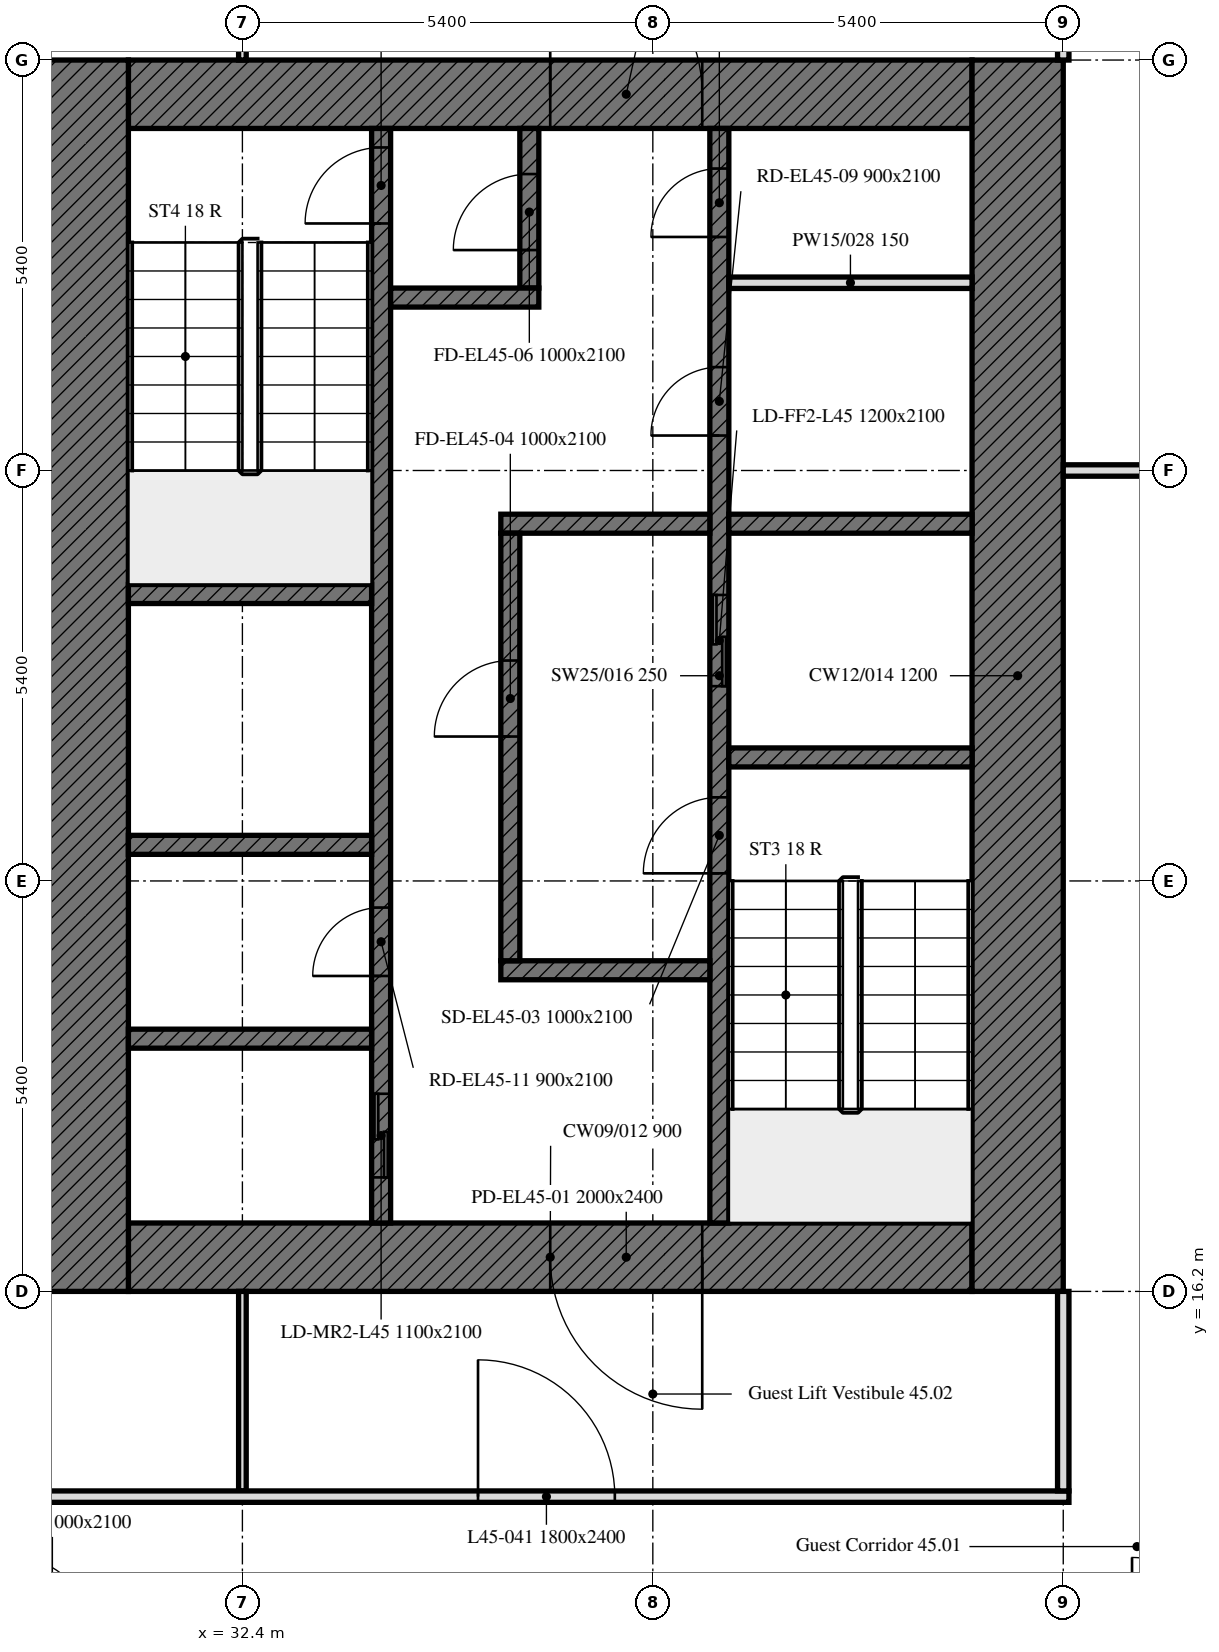
"""IFC4 building model, lengths in metres.
Left out: names, types, materials, properties, quantities, classifications, styles, units other than length and angle.
Written with IfcOpenShell. Run it as: python <this file> out.ifc"""

import sys

from ifc_helpers import new_model, si_unit, direction, frame, frame_2d, origin, place, context, subcontext, project, spatial, rectangle, extrude, element, fill, save


model = new_model("IFC4")
c1 = context("Model", 3, precision=1e-05, world=origin(), true_north=direction((0.0, 1.0)))
c2 = subcontext(c1, "Body", "Model", "MODEL_VIEW")
j1 = project(units=[si_unit("LENGTHUNIT", "METRE"), si_unit("PLANEANGLEUNIT", "RADIAN")], contexts=[c1])
p1 = place(None, origin())
s1 = spatial("IfcSite", under=j1, at=p1, CompositionType="ELEMENT")
p2 = place(p1, origin())
s2 = spatial("IfcBuilding", under=s1, at=p2, CompositionType="ELEMENT")
p3 = place(p2, frame((0.0, 0.0, 187.3)))
s3 = spatial("IfcBuildingStorey", under=s2, at=p3, CompositionType="ELEMENT", Elevation=187.3)
p4 = place(p3, frame((42.0, 16.65, 0.0), z_axis=(0.0, 0.0, 1.0), x_axis=(-1.0, 0.0, 0.0)))
e1 = element("IfcWall", 1, at=p4, inside=s3, PredefinedType="SOLIDWALL", context=c2, shape_type="SweptSolid", body=[
    extrude(rectangle(XDim=11.1, YDim=0.9, at=frame_2d((5.55, 0.0))), origin(), (0.0, 0.0, 1.0), 3.0),
])
p5 = place(p4, frame((3.55, 0.0, 0.0)))
e2 = element("IfcOpeningElement", 2, at=p5, cuts=e1, PredefinedType="OPENING", context=c2, shape_type="SweptSolid", body=[
    extrude(rectangle(XDim=2.0, YDim=2.4, at=frame_2d((1.0, 1.2))), frame((0.0, 0.45, 0.0), z_axis=(0.0, -1.0, 0.0), x_axis=(1.0, 0.0, 0.0)), (0.0, 0.0, 1.0), 0.9),
])
p6 = place(p3, frame((30.9, 31.95, 0.0), z_axis=(0.0, 0.0, 1.0), x_axis=(1.0, 0.0, 0.0)))
e3 = element("IfcWall", 3, at=p6, inside=s3, PredefinedType="SOLIDWALL", context=c2, shape_type="SweptSolid", body=[
    extrude(rectangle(XDim=11.1, YDim=0.9, at=frame_2d((5.55, 0.0))), origin(), (0.0, 0.0, 1.0), 3.0),
])
p7 = place(p6, frame((5.55, 0.0, 0.0)))
e4 = element("IfcOpeningElement", 4, at=p7, cuts=e3, PredefinedType="OPENING", context=c2, shape_type="SweptSolid", body=[
    extrude(rectangle(XDim=2.0, YDim=2.4, at=frame_2d((1.0, 1.2))), frame((0.0, 0.45, 0.0), z_axis=(0.0, -1.0, 0.0), x_axis=(1.0, 0.0, 0.0)), (0.0, 0.0, 1.0), 0.9),
])
for number, where, z_axis, x_axis in (
    (5, (42.6, 32.4, 0.0), (0.0, 0.0, 1.0), (0.0, -1.0, 0.0)),
    (6, (30.3, 16.2, 0.0), (0.0, 0.0, 1.0), (0.0, 1.0, 0.0)),
):
    element("IfcWall", number, at=place(p3, frame(where, z_axis=z_axis, x_axis=x_axis)), inside=s3, PredefinedType="SOLIDWALL", context=c2, shape_type="SweptSolid", body=[
        extrude(rectangle(XDim=16.2, YDim=1.2, at=frame_2d((8.1, 0.0))), origin(), (0.0, 0.0, 1.0), 3.0),
    ])
p8 = place(p3, frame((38.675, 17.1, 0.0), z_axis=(0.0, 0.0, 1.0), x_axis=(0.0, 1.0, 0.0)))
e7 = element("IfcWall", 7, at=p8, inside=s3, PredefinedType="SOLIDWALL", context=c2, shape_type="SweptSolid", body=[
    extrude(rectangle(XDim=14.4, YDim=0.25, at=frame_2d((7.2, 0.0))), origin(), (0.0, 0.0, 1.0), 3.0),
])
p9 = place(p8, frame((4.6, 0.0, 0.0)))
e8 = element("IfcOpeningElement", 8, at=p9, cuts=e7, PredefinedType="OPENING", context=c2, shape_type="SweptSolid", body=[
    extrude(rectangle(XDim=1.0, YDim=2.1, at=frame_2d((0.5, 1.05))), frame((0.0, 0.125, 0.0), z_axis=(0.0, -1.0, 0.0), x_axis=(1.0, 0.0, 0.0)), (0.0, 0.0, 1.0), 0.25),
])
p10 = place(p8, frame((7.062, 0.0, 0.0)))
e9 = element("IfcOpeningElement", 9, at=p10, cuts=e7, PredefinedType="OPENING", context=c2, shape_type="SweptSolid", body=[
    extrude(rectangle(XDim=1.2, YDim=2.1, at=frame_2d((0.6, 1.05))), frame((0.0, 0.125, 0.0), z_axis=(0.0, -1.0, 0.0), x_axis=(1.0, 0.0, 0.0)), (0.0, 0.0, 1.0), 0.25),
])
p11 = place(p8, frame((10.36, 0.0, 0.0)))
e10 = element("IfcOpeningElement", 10, at=p11, cuts=e7, PredefinedType="OPENING", context=c2, shape_type="SweptSolid", body=[
    extrude(rectangle(XDim=0.9, YDim=2.1, at=frame_2d((0.45, 1.05))), frame((0.0, 0.125, 0.0), z_axis=(0.0, -1.0, 0.0), x_axis=(1.0, 0.0, 0.0)), (0.0, 0.0, 1.0), 0.25),
])
p12 = place(p8, frame((12.972, 0.0, 0.0)))
e11 = element("IfcOpeningElement", 11, at=p12, cuts=e7, PredefinedType="OPENING", context=c2, shape_type="SweptSolid", body=[
    extrude(rectangle(XDim=0.9, YDim=2.1, at=frame_2d((0.45, 1.05))), frame((0.0, 0.125, 0.0), z_axis=(0.0, -1.0, 0.0), x_axis=(1.0, 0.0, 0.0)), (0.0, 0.0, 1.0), 0.25),
])
p13 = place(p3, frame((34.225, 17.1, 0.0), z_axis=(0.0, 0.0, 1.0), x_axis=(0.0, 1.0, 0.0)))
e12 = element("IfcWall", 12, at=p13, inside=s3, PredefinedType="SOLIDWALL", context=c2, shape_type="SweptSolid", body=[
    extrude(rectangle(XDim=14.4, YDim=0.25, at=frame_2d((7.2, 0.0))), origin(), (0.0, 0.0, 1.0), 3.0),
])
p14 = place(p13, frame((13.15, 0.0, 0.0)))
e13 = element("IfcOpeningElement", 13, at=p14, cuts=e12, PredefinedType="OPENING", context=c2, shape_type="SweptSolid", body=[
    extrude(rectangle(XDim=1.0, YDim=2.1, at=frame_2d((0.5, 1.05))), frame((0.0, 0.125, 0.0), z_axis=(0.0, -1.0, 0.0), x_axis=(1.0, 0.0, 0.0)), (0.0, 0.0, 1.0), 0.25),
])
p15 = place(p13, frame((0.6, 0.0, 0.0)))
e14 = element("IfcOpeningElement", 14, at=p15, cuts=e12, PredefinedType="OPENING", context=c2, shape_type="SweptSolid", body=[
    extrude(rectangle(XDim=1.1, YDim=2.1, at=frame_2d((0.55, 1.05))), frame((0.0, 0.125, 0.0), z_axis=(0.0, -1.0, 0.0), x_axis=(1.0, 0.0, 0.0)), (0.0, 0.0, 1.0), 0.25),
])
p16 = place(p13, frame((3.25, 0.0, 0.0)))
e15 = element("IfcOpeningElement", 15, at=p16, cuts=e12, PredefinedType="OPENING", context=c2, shape_type="SweptSolid", body=[
    extrude(rectangle(XDim=0.9, YDim=2.1, at=frame_2d((0.45, 1.05))), frame((0.0, 0.125, 0.0), z_axis=(0.0, -1.0, 0.0), x_axis=(1.0, 0.0, 0.0)), (0.0, 0.0, 1.0), 0.25),
])
p17 = place(p3, frame((38.8, 23.225, 0.0), z_axis=(0.0, 0.0, 1.0), x_axis=(1.0, 0.0, 0.0)))
e16 = element("IfcWall", 16, at=p17, inside=s3, PredefinedType="SOLIDWALL", context=c2, shape_type="SweptSolid", body=[
    extrude(rectangle(XDim=3.2, YDim=0.25, at=frame_2d((1.6, 0.0))), origin(), (0.0, 0.0, 1.0), 3.0),
])
for number, where, z_axis, x_axis in (
    (17, (30.9, 25.375, 0.0), (0.0, 0.0, 1.0), (1.0, 0.0, 0.0)),
    (18, (30.9, 22.075, 0.0), (0.0, 0.0, 1.0), (1.0, 0.0, 0.0)),
):
    element("IfcWall", number, at=place(p3, frame(where, z_axis=z_axis, x_axis=x_axis)), inside=s3, PredefinedType="SOLIDWALL", context=c2, shape_type="SweptSolid", body=[
        extrude(rectangle(XDim=3.2, YDim=0.25, at=frame_2d((1.6, 0.0))), origin(), (0.0, 0.0, 1.0), 3.0),
    ])
p18 = place(p3, frame((38.8, 26.3, 0.0), z_axis=(0.0, 0.0, 1.0), x_axis=(1.0, 0.0, 0.0)))
e19 = element("IfcWall", 19, at=p18, inside=s3, PredefinedType="SOLIDWALL", context=c2, shape_type="SweptSolid", body=[
    extrude(rectangle(XDim=3.2, YDim=0.25, at=frame_2d((1.6, 0.0))), origin(), (0.0, 0.0, 1.0), 3.0),
])
for number, where, z_axis, x_axis in (
    (20, (35.8, 26.3, 0.0), (0.0, 0.0, 1.0), (1.0, 0.0, 0.0)),
    (21, (35.8, 20.425, 0.0), (0.0, 0.0, 1.0), (1.0, 0.0, 0.0)),
):
    element("IfcWall", number, at=place(p3, frame(where, z_axis=z_axis, x_axis=x_axis)), inside=s3, PredefinedType="SOLIDWALL", context=c2, shape_type="SweptSolid", body=[
        extrude(rectangle(XDim=2.75, YDim=0.25, at=frame_2d((1.375, 0.0))), origin(), (0.0, 0.0, 1.0), 3.0),
    ])
p19 = place(p3, frame((36.175, 29.4, 0.0), z_axis=(0.0, 0.0, 1.0), x_axis=(0.0, 1.0, 0.0)))
e22 = element("IfcWall", 22, at=p19, inside=s3, PredefinedType="SOLIDWALL", context=c2, shape_type="SweptSolid", body=[
    extrude(rectangle(XDim=2.1, YDim=0.25, at=frame_2d((1.05, 0.0))), origin(), (0.0, 0.0, 1.0), 3.0),
])
p20 = place(p19, frame((0.5, 0.0, 0.0)))
e23 = element("IfcOpeningElement", 23, at=p20, cuts=e22, PredefinedType="OPENING", context=c2, shape_type="SweptSolid", body=[
    extrude(rectangle(XDim=1.0, YDim=2.1, at=frame_2d((0.5, 1.05))), frame((0.0, 0.125, 0.0), z_axis=(0.0, -1.0, 0.0), x_axis=(1.0, 0.0, 0.0)), (0.0, 0.0, 1.0), 0.25),
])
p21 = place(p3, frame((34.35, 29.275, 0.0), z_axis=(0.0, 0.0, 1.0), x_axis=(1.0, 0.0, 0.0)))
e24 = element("IfcWall", 24, at=p21, inside=s3, PredefinedType="SOLIDWALL", context=c2, shape_type="SweptSolid", body=[
    extrude(rectangle(XDim=1.95, YDim=0.25, at=frame_2d((0.975, 0.0))), origin(), (0.0, 0.0, 1.0), 3.0),
])
p22 = place(p3, frame((35.925, 20.55, 0.0), z_axis=(0.0, 0.0, 1.0), x_axis=(0.0, 1.0, 0.0)))
e25 = element("IfcWall", 25, at=p22, inside=s3, PredefinedType="SOLIDWALL", context=c2, shape_type="SweptSolid", body=[
    extrude(rectangle(XDim=5.625, YDim=0.25, at=frame_2d((2.812, 0.0))), origin(), (0.0, 0.0, 1.0), 3.0),
])
p23 = place(p22, frame((2.95, 0.0, 0.0)))
e26 = element("IfcOpeningElement", 26, at=p23, cuts=e25, PredefinedType="OPENING", context=c2, shape_type="SweptSolid", body=[
    extrude(rectangle(XDim=1.0, YDim=2.1, at=frame_2d((0.5, 1.05))), frame((0.0, 0.125, 0.0), z_axis=(0.0, -1.0, 0.0), x_axis=(1.0, 0.0, 0.0)), (0.0, 0.0, 1.0), 0.25),
])
p24 = place(p3, frame((30.9, 19.525, 0.0), z_axis=(0.0, 0.0, 1.0), x_axis=(1.0, 0.0, 0.0)))
e27 = element("IfcWall", 27, at=p24, inside=s3, PredefinedType="SOLIDWALL", context=c2, shape_type="SweptSolid", body=[
    extrude(rectangle(XDim=3.2, YDim=0.25, at=frame_2d((1.6, 0.0))), origin(), (0.0, 0.0, 1.0), 3.0),
])
p25 = place(p3, frame((38.8, 29.47, 0.0), z_axis=(0.0, 0.0, 1.0), x_axis=(1.0, 0.0, 0.0)))
e28 = element("IfcWall", 28, at=p25, inside=s3, PredefinedType="PARTITIONING", context=c2, shape_type="SweptSolid", body=[
    extrude(rectangle(XDim=3.2, YDim=0.15, at=frame_2d((1.6, 0.0))), origin(), (0.0, 0.0, 1.0), 3.0),
])
p26 = place(p3, frame((32.4, 32.4, 0.0), z_axis=(0.0, 0.0, 1.0), x_axis=(0.0, 1.0, 0.0)))
e29 = element("IfcWall", 29, at=p26, inside=s3, PredefinedType="PARTITIONING", context=c2, shape_type="SweptSolid", body=[
    extrude(rectangle(XDim=4.98, YDim=0.1, at=frame_2d((2.49, 0.0))), origin(), (0.0, 0.0, 1.0), 2.4),
])
p27 = place(p3, frame((43.2, 32.4, 0.0), z_axis=(0.0, 0.0, 1.0), x_axis=(0.0, 1.0, 0.0)))
e30 = element("IfcWall", 30, at=p27, inside=s3, PredefinedType="PARTITIONING", context=c2, shape_type="SweptSolid", body=[
    extrude(rectangle(XDim=4.98, YDim=0.15, at=frame_2d((2.49, 0.0))), origin(), (0.0, 0.0, 1.0), 3.0),
])
p28 = place(p3, frame((43.2, 27.0, 0.0), z_axis=(0.0, 0.0, 1.0), x_axis=(1.0, 0.0, 0.0)))
e31 = element("IfcWall", 31, at=p28, inside=s3, PredefinedType="PARTITIONING", context=c2, shape_type="SweptSolid", body=[
    extrude(rectangle(XDim=2.025, YDim=0.15, at=frame_2d((1.013, 0.0))), origin(), (0.0, 0.0, 1.0), 2.4),
])
p29 = place(p3, frame((32.4, 13.575, 0.0), z_axis=(0.0, 0.0, 1.0), x_axis=(0.0, 1.0, 0.0)))
e32 = element("IfcWall", 32, at=p29, inside=s3, PredefinedType="PARTITIONING", context=c2, shape_type="SweptSolid", body=[
    extrude(rectangle(XDim=2.625, YDim=0.1, at=frame_2d((1.312, 0.0))), origin(), (0.0, 0.0, 1.0), 3.0),
])
p30 = place(p3, frame((6.151, 13.5, 0.0), z_axis=(0.0, 0.0, 1.0), x_axis=(1.0, 0.0, 0.0)))
e33 = element("IfcWall", 33, at=p30, inside=s3, PredefinedType="PARTITIONING", context=c2, shape_type="SweptSolid", body=[
    extrude(rectangle(XDim=37.124, YDim=0.15, at=frame_2d((18.562, 0.0))), origin(), (0.0, 0.0, 1.0), 3.0),
])
p31 = place(p30, frame((17.649, 0.0, 0.0)))
e34 = element("IfcOpeningElement", 34, at=p31, cuts=e33, PredefinedType="OPENING", context=c2, shape_type="SweptSolid", body=[
    extrude(rectangle(XDim=1.0, YDim=2.1, at=frame_2d((0.5, 1.05))), frame((0.0, 0.075, 0.0), z_axis=(0.0, -1.0, 0.0), x_axis=(1.0, 0.0, 0.0)), (0.0, 0.0, 1.0), 0.15),
])
p32 = place(p30, frame((2.349, 0.0, 0.0)))
e35 = element("IfcOpeningElement", 35, at=p32, cuts=e33, PredefinedType="OPENING", context=c2, shape_type="SweptSolid", body=[
    extrude(rectangle(XDim=1.8, YDim=2.4, at=frame_2d((0.9, 1.2))), frame((0.0, 0.075, 0.0), z_axis=(0.0, -1.0, 0.0), x_axis=(1.0, 0.0, 0.0)), (0.0, 0.0, 1.0), 0.15),
])
p33 = place(p30, frame((29.349, 0.0, 0.0)))
e36 = element("IfcOpeningElement", 36, at=p33, cuts=e33, PredefinedType="OPENING", context=c2, shape_type="SweptSolid", body=[
    extrude(rectangle(XDim=1.8, YDim=2.4, at=frame_2d((0.9, 1.2))), frame((0.0, 0.075, 0.0), z_axis=(0.0, -1.0, 0.0), x_axis=(1.0, 0.0, 0.0)), (0.0, 0.0, 1.0), 0.15),
])
p34 = place(p3, frame((43.2, 13.575, 0.0), z_axis=(0.0, 0.0, 1.0), x_axis=(0.0, 1.0, 0.0)))
e37 = element("IfcWall", 37, at=p34, inside=s3, PredefinedType="PARTITIONING", context=c2, shape_type="SweptSolid", body=[
    extrude(rectangle(XDim=2.625, YDim=0.15, at=frame_2d((1.312, 0.0))), origin(), (0.0, 0.0, 1.0), 3.0),
])
p35 = place(p5, origin())
e38 = element("IfcDoor", 38, at=p35, inside=s3, OperationType="DOUBLE_DOOR_SINGLE_SWING", PredefinedType="DOOR", context=c2, shape_type="SweptSolid", body=[
    extrude(rectangle(XDim=2.0, YDim=2.4, at=frame_2d((1.0, 1.2))), frame((0.0, 0.025, 0.0), z_axis=(0.0, -1.0, 0.0), x_axis=(1.0, 0.0, 0.0)), (0.0, 0.0, 1.0), 0.05),
])
fill(e2, e38)
p36 = place(p7, origin())
e39 = element("IfcDoor", 39, at=p36, inside=s3, OperationType="DOUBLE_DOOR_SINGLE_SWING", PredefinedType="DOOR", context=c2, shape_type="SweptSolid", body=[
    extrude(rectangle(XDim=2.0, YDim=2.4, at=frame_2d((1.0, 1.2))), frame((0.0, 0.025, 0.0), z_axis=(0.0, -1.0, 0.0), x_axis=(1.0, 0.0, 0.0)), (0.0, 0.0, 1.0), 0.05),
])
fill(e4, e39)
p37 = place(p9, origin())
e40 = element("IfcDoor", 40, at=p37, inside=s3, OperationType="SINGLE_SWING_LEFT", PredefinedType="DOOR", context=c2, shape_type="SweptSolid", body=[
    extrude(rectangle(XDim=1.0, YDim=2.1, at=frame_2d((0.5, 1.05))), frame((0.0, 0.025, 0.0), z_axis=(0.0, -1.0, 0.0), x_axis=(1.0, 0.0, 0.0)), (0.0, 0.0, 1.0), 0.05),
])
fill(e8, e40)
p38 = place(p23, origin())
e41 = element("IfcDoor", 41, at=p38, inside=s3, OperationType="SINGLE_SWING_LEFT", PredefinedType="DOOR", context=c2, shape_type="SweptSolid", body=[
    extrude(rectangle(XDim=1.0, YDim=2.1, at=frame_2d((0.5, 1.05))), frame((0.0, 0.025, 0.0), z_axis=(0.0, -1.0, 0.0), x_axis=(1.0, 0.0, 0.0)), (0.0, 0.0, 1.0), 0.05),
])
fill(e26, e41)
p39 = place(p14, origin())
e42 = element("IfcDoor", 42, at=p39, inside=s3, OperationType="SINGLE_SWING_LEFT", PredefinedType="DOOR", context=c2, shape_type="SweptSolid", body=[
    extrude(rectangle(XDim=1.0, YDim=2.1, at=frame_2d((0.5, 1.05))), frame((0.0, 0.025, 0.0), z_axis=(0.0, -1.0, 0.0), x_axis=(1.0, 0.0, 0.0)), (0.0, 0.0, 1.0), 0.05),
])
fill(e13, e42)
p40 = place(p20, origin())
e43 = element("IfcDoor", 43, at=p40, inside=s3, OperationType="SINGLE_SWING_LEFT", PredefinedType="DOOR", context=c2, shape_type="SweptSolid", body=[
    extrude(rectangle(XDim=1.0, YDim=2.1, at=frame_2d((0.5, 1.05))), frame((0.0, 0.025, 0.0), z_axis=(0.0, -1.0, 0.0), x_axis=(1.0, 0.0, 0.0)), (0.0, 0.0, 1.0), 0.05),
])
fill(e23, e43)
p41 = place(p10, origin())
e44 = element("IfcDoor", 44, at=p41, inside=s3, OperationType="DOUBLE_DOOR_SLIDING", PredefinedType="DOOR", context=c2, shape_type="SweptSolid", body=[
    extrude(rectangle(XDim=1.2, YDim=2.1, at=frame_2d((0.6, 1.05))), frame((0.0, 0.025, 0.0), z_axis=(0.0, -1.0, 0.0), x_axis=(1.0, 0.0, 0.0)), (0.0, 0.0, 1.0), 0.05),
])
fill(e9, e44)
p42 = place(p15, origin())
e45 = element("IfcDoor", 45, at=p42, inside=s3, OperationType="DOUBLE_DOOR_SLIDING", PredefinedType="DOOR", context=c2, shape_type="SweptSolid", body=[
    extrude(rectangle(XDim=1.1, YDim=2.1, at=frame_2d((0.55, 1.05))), frame((0.0, 0.025, 0.0), z_axis=(0.0, -1.0, 0.0), x_axis=(1.0, 0.0, 0.0)), (0.0, 0.0, 1.0), 0.05),
])
fill(e14, e45)
p43 = place(p11, origin())
e46 = element("IfcDoor", 46, at=p43, inside=s3, OperationType="SINGLE_SWING_LEFT", PredefinedType="DOOR", context=c2, shape_type="SweptSolid", body=[
    extrude(rectangle(XDim=0.9, YDim=2.1, at=frame_2d((0.45, 1.05))), frame((0.0, 0.025, 0.0), z_axis=(0.0, -1.0, 0.0), x_axis=(1.0, 0.0, 0.0)), (0.0, 0.0, 1.0), 0.05),
])
fill(e10, e46)
p44 = place(p12, origin())
e47 = element("IfcDoor", 47, at=p44, inside=s3, OperationType="SINGLE_SWING_LEFT", PredefinedType="DOOR", context=c2, shape_type="SweptSolid", body=[
    extrude(rectangle(XDim=0.9, YDim=2.1, at=frame_2d((0.45, 1.05))), frame((0.0, 0.025, 0.0), z_axis=(0.0, -1.0, 0.0), x_axis=(1.0, 0.0, 0.0)), (0.0, 0.0, 1.0), 0.05),
])
fill(e11, e47)
p45 = place(p16, origin())
e48 = element("IfcDoor", 48, at=p45, inside=s3, OperationType="SINGLE_SWING_LEFT", PredefinedType="DOOR", context=c2, shape_type="SweptSolid", body=[
    extrude(rectangle(XDim=0.9, YDim=2.1, at=frame_2d((0.45, 1.05))), frame((0.0, 0.025, 0.0), z_axis=(0.0, -1.0, 0.0), x_axis=(1.0, 0.0, 0.0)), (0.0, 0.0, 1.0), 0.05),
])
fill(e15, e48)
p46 = place(p33, origin())
e49 = element("IfcDoor", 49, at=p46, inside=s3, OperationType="DOUBLE_DOOR_SINGLE_SWING", PredefinedType="DOOR", context=c2, shape_type="SweptSolid", body=[
    extrude(rectangle(XDim=1.8, YDim=2.4, at=frame_2d((0.9, 1.2))), frame((0.0, 0.025, 0.0), z_axis=(0.0, -1.0, 0.0), x_axis=(1.0, 0.0, 0.0)), (0.0, 0.0, 1.0), 0.05),
])
fill(e36, e49)
save(model, sys.argv[1])
